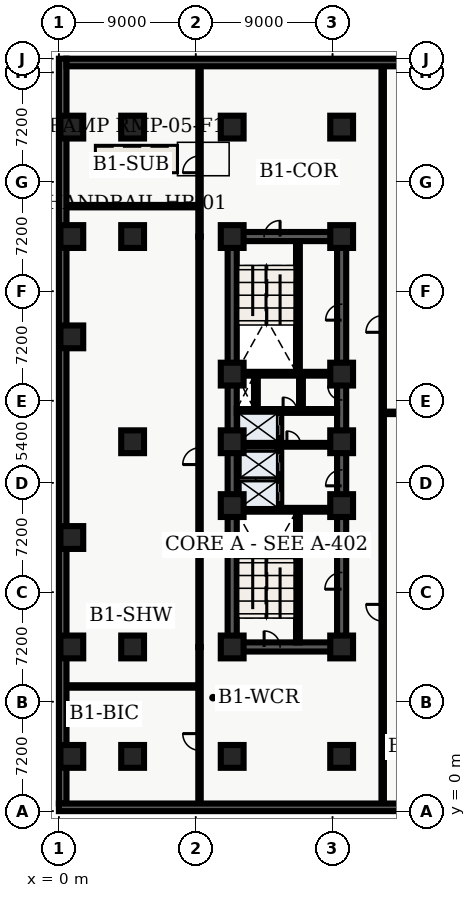
"""IFC4 building model, lengths in metres.
Left out: names, types, materials, properties, quantities, classifications, styles, units other than length and angle.
Written with IfcOpenShell. Run it as: python <this file> out.ifc"""

import sys

from ifc_helpers import new_model, entity, si_unit, converted_unit, direction, frame, origin_with_axes, origin_2d_with_axis, place, context, subcontext, project, spatial, polyline, rectangle, outline, extrude, element, fill, save


model = new_model("IFC4")
c1 = context("Model", 3, precision=1e-05, world=origin_with_axes(), true_north=direction((0.0, 1.0)))
c2 = subcontext(c1, "Body", "Model", "MODEL_VIEW")
j1 = project(units=[si_unit("LENGTHUNIT", "METRE"), converted_unit("PLANEANGLEUNIT", "DEGREE", entity("IfcPlaneAngleMeasure", 0.017), si_unit("PLANEANGLEUNIT", "RADIAN"), dimensions=[0, 0, 0, 0, 0, 0, 0])], contexts=[c1])
p1 = place(None, origin_with_axes())
s1 = spatial("IfcSite", under=j1, at=p1, CompositionType="ELEMENT")
p2 = place(p1, origin_with_axes())
s2 = spatial("IfcBuilding", under=s1, at=p2, CompositionType="ELEMENT")
p3 = place(p2, frame((0.0, 0.0, -4.8), z_axis=(0.0, 0.0, 1.0), x_axis=(1.0, 0.0, 0.0)))
s3 = spatial("IfcBuildingStorey", under=s2, at=p3, CompositionType="ELEMENT", Elevation=-4.8)
p4 = place(p3, frame((11.4, 10.8, 0.0), z_axis=(0.0, 0.0, 1.0), x_axis=(0.0, 1.0, 0.0)))
e1 = element("IfcWall", 1, at=p4, inside=s3, PredefinedType="SHEAR", context=c2, shape_type="SweptSolid", body=[
    extrude(outline(polyline([(0.0, -0.3), (27.0, -0.3), (27.0, 0.3), (0.0, 0.3), (0.0, -0.3)])), origin_with_axes(), (0.0, 0.0, 1.0), 4.48),
])
p5 = place(p3, frame((11.4, 10.8, 0.0), z_axis=(0.0, 0.0, 1.0), x_axis=(1.0, 0.0, 0.0)))
e2 = element("IfcWall", 2, at=p5, inside=s3, PredefinedType="SHEAR", context=c2, shape_type="SweptSolid", body=[
    extrude(outline(polyline([(0.0, -0.3), (7.2, -0.3), (7.2, 0.3), (0.0, 0.3), (0.0, -0.3)])), origin_with_axes(), (0.0, 0.0, 1.0), 4.48),
])
p6 = place(p5, frame((2.625, 0.0, 0.0), z_axis=(0.0, 0.0, 1.0), x_axis=(1.0, 0.0, 0.0)))
e3 = element("IfcOpeningElement", 3, at=p6, cuts=e2, PredefinedType="OPENING", context=c2, shape_type="SweptSolid", body=[
    extrude(rectangle(XDim=1.05, YDim=0.62, at=origin_2d_with_axis()), origin_with_axes(), (0.0, 0.0, 1.0), 2.15),
])
p7 = place(p3, frame((11.4, 37.8, 0.0), z_axis=(0.0, 0.0, 1.0), x_axis=(1.0, 0.0, 0.0)))
e4 = element("IfcWall", 4, at=p7, inside=s3, PredefinedType="SHEAR", context=c2, shape_type="SweptSolid", body=[
    extrude(outline(polyline([(0.0, -0.3), (7.2, -0.3), (7.2, 0.3), (0.0, 0.3), (0.0, -0.3)])), origin_with_axes(), (0.0, 0.0, 1.0), 4.48),
])
p8 = place(p7, frame((2.625, 0.0, 0.0), z_axis=(0.0, 0.0, 1.0), x_axis=(1.0, 0.0, 0.0)))
e5 = element("IfcOpeningElement", 5, at=p8, cuts=e4, PredefinedType="OPENING", context=c2, shape_type="SweptSolid", body=[
    extrude(rectangle(XDim=1.05, YDim=0.62, at=origin_2d_with_axis()), origin_with_axes(), (0.0, 0.0, 1.0), 2.15),
])
p9 = place(p3, frame((18.6, 10.8, 0.0), z_axis=(0.0, 0.0, 1.0), x_axis=(0.0, 1.0, 0.0)))
e6 = element("IfcWall", 6, at=p9, inside=s3, PredefinedType="SHEAR", context=c2, shape_type="SweptSolid", body=[
    extrude(outline(polyline([(0.0, -0.3), (13.5, -0.3), (13.5, 0.3), (0.0, 0.3), (0.0, -0.3)])), origin_with_axes(), (0.0, 0.0, 1.0), 4.48),
])
p10 = place(p9, frame((11.125, 0.0, 0.0), z_axis=(0.0, 0.0, 1.0), x_axis=(1.0, 0.0, 0.0)))
e7 = element("IfcOpeningElement", 7, at=p10, cuts=e6, PredefinedType="OPENING", context=c2, shape_type="SweptSolid", body=[
    extrude(rectangle(XDim=1.05, YDim=0.62, at=origin_2d_with_axis()), origin_with_axes(), (0.0, 0.0, 1.0), 2.15),
])
p11 = place(p9, frame((4.35, 0.0, 0.0), z_axis=(0.0, 0.0, 1.0), x_axis=(1.0, 0.0, 0.0)))
e8 = element("IfcOpeningElement", 8, at=p11, cuts=e6, PredefinedType="OPENING", context=c2, shape_type="SweptSolid", body=[
    extrude(rectangle(XDim=1.1, YDim=0.62, at=origin_2d_with_axis()), origin_with_axes(), (0.0, 0.0, 1.0), 2.15),
])
p12 = place(p3, frame((18.6, 24.3, 0.0), z_axis=(0.0, 0.0, 1.0), x_axis=(0.0, 1.0, 0.0)))
e9 = element("IfcWall", 9, at=p12, inside=s3, PredefinedType="SHEAR", context=c2, shape_type="SweptSolid", body=[
    extrude(outline(polyline([(0.0, -0.3), (13.5, -0.3), (13.5, 0.3), (0.0, 0.3), (0.0, -0.3)])), origin_with_axes(), (0.0, 0.0, 1.0), 4.48),
])
p13 = place(p12, frame((3.2, 0.0, 0.0), z_axis=(0.0, 0.0, 1.0), x_axis=(1.0, 0.0, 0.0)))
e10 = element("IfcOpeningElement", 10, at=p13, cuts=e9, PredefinedType="OPENING", context=c2, shape_type="SweptSolid", body=[
    extrude(rectangle(XDim=0.9, YDim=0.62, at=origin_2d_with_axis()), origin_with_axes(), (0.0, 0.0, 1.0), 2.15),
])
p14 = place(p12, frame((8.525, 0.0, 0.0), z_axis=(0.0, 0.0, 1.0), x_axis=(1.0, 0.0, 0.0)))
e11 = element("IfcOpeningElement", 11, at=p14, cuts=e9, PredefinedType="OPENING", context=c2, shape_type="SweptSolid", body=[
    extrude(rectangle(XDim=1.05, YDim=0.62, at=origin_2d_with_axis()), origin_with_axes(), (0.0, 0.0, 1.0), 2.15),
])
p15 = place(p3, frame((15.725, 11.1, 0.0), z_axis=(0.0, 0.0, 1.0), x_axis=(0.0, 1.0, 0.0)))
e12 = element("IfcWall", 12, at=p15, inside=s3, PredefinedType="SHEAR", context=c2, shape_type="SweptSolid", body=[
    extrude(outline(polyline([(0.0, -0.125), (8.6, -0.125), (8.6, 0.125), (0.0, 0.125), (0.0, -0.125)])), origin_with_axes(), (0.0, 0.0, 1.0), 4.48),
])
p16 = place(p3, frame((11.7, 19.825, 0.0), z_axis=(0.0, 0.0, 1.0), x_axis=(1.0, 0.0, 0.0)))
e13 = element("IfcWall", 13, at=p16, inside=s3, PredefinedType="SHEAR", context=c2, shape_type="SweptSolid", body=[
    extrude(outline(polyline([(0.0, -0.125), (6.6, -0.125), (6.6, 0.125), (0.0, 0.125), (0.0, -0.125)])), origin_with_axes(), (0.0, 0.0, 1.0), 4.48),
])
p17 = place(p3, frame((15.725, 28.9, 0.0), z_axis=(0.0, 0.0, 1.0), x_axis=(0.0, 1.0, 0.0)))
e14 = element("IfcWall", 14, at=p17, inside=s3, PredefinedType="SHEAR", context=c2, shape_type="SweptSolid", body=[
    extrude(outline(polyline([(0.0, -0.125), (8.6, -0.125), (8.6, 0.125), (0.0, 0.125), (0.0, -0.125)])), origin_with_axes(), (0.0, 0.0, 1.0), 4.48),
])
p18 = place(p3, frame((11.7, 28.775, 0.0), z_axis=(0.0, 0.0, 1.0), x_axis=(1.0, 0.0, 0.0)))
e15 = element("IfcWall", 15, at=p18, inside=s3, PredefinedType="SHEAR", context=c2, shape_type="SweptSolid", body=[
    extrude(outline(polyline([(0.0, -0.125), (6.6, -0.125), (6.6, 0.125), (0.0, 0.125), (0.0, -0.125)])), origin_with_axes(), (0.0, 0.0, 1.0), 4.48),
])
p19 = place(p3, frame((14.5, 19.95, 0.0), z_axis=(0.0, 0.0, 1.0), x_axis=(0.0, 1.0, 0.0)))
e16 = element("IfcWall", 16, at=p19, inside=s3, PredefinedType="SOLIDWALL", context=c2, shape_type="SweptSolid", body=[
    extrude(outline(polyline([(0.0, -0.125), (6.25, -0.125), (6.25, 0.125), (0.0, 0.125), (0.0, -0.125)])), origin_with_axes(), (0.0, 0.0, 1.0), 3.52),
])
p20 = place(p19, frame((1.025, 0.0, 0.0), z_axis=(0.0, 0.0, 1.0), x_axis=(1.0, 0.0, 0.0)))
e17 = element("IfcOpeningElement", 17, at=p20, cuts=e16, PredefinedType="OPENING", context=c2, shape_type="SweptSolid", body=[
    extrude(rectangle(XDim=1.1, YDim=0.27, at=origin_2d_with_axis()), origin_with_axes(), (0.0, 0.0, 1.0), 2.15),
])
p21 = place(p19, frame((2.975, 0.0, 0.0), z_axis=(0.0, 0.0, 1.0), x_axis=(1.0, 0.0, 0.0)))
e18 = element("IfcOpeningElement", 18, at=p21, cuts=e16, PredefinedType="OPENING", context=c2, shape_type="SweptSolid", body=[
    extrude(rectangle(XDim=1.1, YDim=0.27, at=origin_2d_with_axis()), origin_with_axes(), (0.0, 0.0, 1.0), 2.15),
])
p22 = place(p19, frame((5.425, 0.0, 0.0), z_axis=(0.0, 0.0, 1.0), x_axis=(1.0, 0.0, 0.0)))
e19 = element("IfcOpeningElement", 19, at=p22, cuts=e16, PredefinedType="OPENING", context=c2, shape_type="SweptSolid", body=[
    extrude(rectangle(XDim=1.2, YDim=0.27, at=origin_2d_with_axis()), origin_with_axes(), (0.0, 0.0, 1.0), 2.15),
])
p23 = place(p3, frame((11.7, 24.1, 0.0), z_axis=(0.0, 0.0, 1.0), x_axis=(1.0, 0.0, 0.0)))
e20 = element("IfcWall", 20, at=p23, inside=s3, PredefinedType="SOLIDWALL", context=c2, shape_type="SweptSolid", body=[
    extrude(outline(polyline([(0.0, -0.125), (6.6, -0.125), (6.6, 0.125), (0.0, 0.125), (0.0, -0.125)])), origin_with_axes(), (0.0, 0.0, 1.0), 3.52),
])
p24 = place(p23, frame((3.75, 0.0, 0.0), z_axis=(0.0, 0.0, 1.0), x_axis=(1.0, 0.0, 0.0)))
e21 = element("IfcOpeningElement", 21, at=p24, cuts=e20, PredefinedType="OPENING", context=c2, shape_type="SweptSolid", body=[
    extrude(rectangle(XDim=0.9, YDim=0.27, at=origin_2d_with_axis()), origin_with_axes(), (0.0, 0.0, 1.0), 2.15),
])
p25 = place(p3, frame((11.7, 26.325, 0.0), z_axis=(0.0, 0.0, 1.0), x_axis=(1.0, 0.0, 0.0)))
e22 = element("IfcWall", 22, at=p25, inside=s3, PredefinedType="SOLIDWALL", context=c2, shape_type="SweptSolid", body=[
    extrude(outline(polyline([(0.0, -0.125), (6.6, -0.125), (6.6, 0.125), (0.0, 0.125), (0.0, -0.125)])), origin_with_axes(), (0.0, 0.0, 1.0), 3.52),
])
p26 = place(p25, frame((3.5, 0.0, 0.0), z_axis=(0.0, 0.0, 1.0), x_axis=(1.0, 0.0, 0.0)))
e23 = element("IfcOpeningElement", 23, at=p26, cuts=e22, PredefinedType="OPENING", context=c2, shape_type="SweptSolid", body=[
    extrude(rectangle(XDim=0.9, YDim=0.27, at=origin_2d_with_axis()), origin_with_axes(), (0.0, 0.0, 1.0), 2.15),
])
for number, where, z_axis, x_axis in (
    (24, (12.96, 26.45, 0.0), (0.0, 0.0, 1.0), (0.0, 1.0, 0.0)),
    (25, (15.925, 26.45, 0.0), (0.0, 0.0, 1.0), (0.0, 1.0, 0.0)),
):
    element("IfcWall", number, at=place(p3, frame(where, z_axis=z_axis, x_axis=x_axis)), inside=s3, PredefinedType="SOLIDWALL", context=c2, shape_type="SweptSolid", body=[
        extrude(outline(polyline([(0.0, -0.125), (2.2, -0.125), (2.2, 0.125), (0.0, 0.125), (0.0, -0.125)])), origin_with_axes(), (0.0, 0.0, 1.0), 3.52),
    ])
for number, where, z_axis, x_axis in (
    (26, (11.4, 3.6, 0.0), (0.0, 0.0, 1.0), (1.0, 0.0, 0.0)),
    (27, (11.4, 10.8, 0.0), (0.0, 0.0, 1.0), (1.0, 0.0, 0.0)),
    (28, (11.4, 20.1, 0.0), (0.0, 0.0, 1.0), (1.0, 0.0, 0.0)),
    (29, (11.4, 24.3, 0.0), (0.0, 0.0, 1.0), (1.0, 0.0, 0.0)),
    (30, (11.4, 28.75, 0.0), (0.0, 0.0, 1.0), (1.0, 0.0, 0.0)),
    (31, (11.4, 37.8, 0.0), (0.0, 0.0, 1.0), (1.0, 0.0, 0.0)),
    (32, (11.4, 45.0, 0.0), (0.0, 0.0, 1.0), (1.0, 0.0, 0.0)),
    (33, (18.6, 3.6, 0.0), (0.0, 0.0, 1.0), (1.0, 0.0, 0.0)),
    (34, (18.6, 10.8, 0.0), (0.0, 0.0, 1.0), (1.0, 0.0, 0.0)),
    (35, (18.6, 20.1, 0.0), (0.0, 0.0, 1.0), (1.0, 0.0, 0.0)),
    (36, (18.6, 24.3, 0.0), (0.0, 0.0, 1.0), (1.0, 0.0, 0.0)),
    (37, (18.6, 28.75, 0.0), (0.0, 0.0, 1.0), (1.0, 0.0, 0.0)),
    (38, (18.6, 37.8, 0.0), (0.0, 0.0, 1.0), (1.0, 0.0, 0.0)),
    (39, (18.6, 45.0, 0.0), (0.0, 0.0, 1.0), (1.0, 0.0, 0.0)),
    (40, (4.85, 3.6, 0.0), (0.0, 0.0, 1.0), (1.0, 0.0, 0.0)),
    (41, (4.85, 10.8, 0.0), (0.0, 0.0, 1.0), (1.0, 0.0, 0.0)),
    (42, (4.85, 24.3, 0.0), (0.0, 0.0, 1.0), (1.0, 0.0, 0.0)),
    (43, (4.85, 37.8, 0.0), (0.0, 0.0, 1.0), (1.0, 0.0, 0.0)),
    (44, (4.85, 45.0, 0.0), (0.0, 0.0, 1.0), (1.0, 0.0, 0.0)),
    (45, (0.85, 3.6, 0.0), (0.0, 0.0, 1.0), (1.0, 0.0, 0.0)),
    (46, (0.85, 10.8, 0.0), (0.0, 0.0, 1.0), (1.0, 0.0, 0.0)),
    (47, (0.85, 18.0, 0.0), (0.0, 0.0, 1.0), (1.0, 0.0, 0.0)),
    (48, (0.85, 31.2, 0.0), (0.0, 0.0, 1.0), (1.0, 0.0, 0.0)),
    (49, (0.85, 37.8, 0.0), (0.0, 0.0, 1.0), (1.0, 0.0, 0.0)),
    (50, (0.85, 45.0, 0.0), (0.0, 0.0, 1.0), (1.0, 0.0, 0.0)),
):
    element("IfcColumn", number, at=place(p3, frame(where, z_axis=z_axis, x_axis=x_axis)), inside=s3, PredefinedType="COLUMN", context=c2, shape_type="SweptSolid", body=[
        extrude(rectangle(XDim=1.5, YDim=1.5, at=origin_2d_with_axis()), origin_with_axes(), (0.0, 0.0, 1.0), 4.8),
    ])
p27 = place(p3, frame((9.25, 0.5, 0.0), z_axis=(0.0, 0.0, 1.0), x_axis=(0.0, 1.0, 0.0)))
e51 = element("IfcWall", 51, at=p27, inside=s3, PredefinedType="PARTITIONING", context=c2, shape_type="SweptSolid", body=[
    extrude(outline(polyline([(0.0, -0.08), (10.3, -0.08), (10.3, 0.08), (0.0, 0.08), (0.0, -0.08)])), origin_with_axes(), (0.0, 0.0, 1.0), 3.2),
])
p28 = place(p27, frame((4.05, 0.0, 0.0), z_axis=(0.0, 0.0, 1.0), x_axis=(1.0, 0.0, 0.0)))
e52 = element("IfcOpeningElement", 52, at=p28, cuts=e51, PredefinedType="OPENING", context=c2, shape_type="SweptSolid", body=[
    extrude(rectangle(XDim=1.1, YDim=0.18, at=origin_2d_with_axis()), origin_with_axes(), (0.0, 0.0, 1.0), 2.15),
])
p29 = place(p3, frame((9.25, 37.8, 0.0), z_axis=(0.0, 0.0, 1.0), x_axis=(0.0, 1.0, 0.0)))
e53 = element("IfcWall", 53, at=p29, inside=s3, PredefinedType="PARTITIONING", context=c2, shape_type="SweptSolid", body=[
    extrude(outline(polyline([(0.0, -0.08), (11.2, -0.08), (11.2, 0.08), (0.0, 0.08), (0.0, -0.08)])), origin_with_axes(), (0.0, 0.0, 1.0), 3.2),
])
p30 = place(p29, frame((4.75, 0.0, 0.0), z_axis=(0.0, 0.0, 1.0), x_axis=(1.0, 0.0, 0.0)))
e54 = element("IfcOpeningElement", 54, at=p30, cuts=e53, PredefinedType="OPENING", context=c2, shape_type="SweptSolid", body=[
    extrude(rectangle(XDim=1.1, YDim=0.18, at=origin_2d_with_axis()), origin_with_axes(), (0.0, 0.0, 1.0), 2.15),
])
p31 = place(p3, frame((9.25, 10.8, 0.0), z_axis=(0.0, 0.0, 1.0), x_axis=(0.0, 1.0, 0.0)))
e55 = element("IfcWall", 55, at=p31, inside=s3, PredefinedType="PARTITIONING", context=c2, shape_type="SweptSolid", body=[
    extrude(outline(polyline([(0.0, -0.08), (27.0, -0.08), (27.0, 0.08), (0.0, 0.08), (0.0, -0.08)])), origin_with_axes(), (0.0, 0.0, 1.0), 3.2),
])
p32 = place(p31, frame((12.55, 0.0, 0.0), z_axis=(0.0, 0.0, 1.0), x_axis=(1.0, 0.0, 0.0)))
e56 = element("IfcOpeningElement", 56, at=p32, cuts=e55, PredefinedType="OPENING", context=c2, shape_type="SweptSolid", body=[
    extrude(rectangle(XDim=1.1, YDim=0.18, at=origin_2d_with_axis()), origin_with_axes(), (0.0, 0.0, 1.0), 2.15),
])
p33 = place(p3, frame((21.3, 0.5, 0.0), z_axis=(0.0, 0.0, 1.0), x_axis=(0.0, 1.0, 0.0)))
e57 = element("IfcWall", 57, at=p33, inside=s3, PredefinedType="PARTITIONING", context=c2, shape_type="SweptSolid", body=[
    extrude(outline(polyline([(0.0, -0.08), (48.5, -0.08), (48.5, 0.08), (0.0, 0.08), (0.0, -0.08)])), origin_with_axes(), (0.0, 0.0, 1.0), 3.2),
])
p34 = place(p33, frame((31.55, 0.0, 0.0), z_axis=(0.0, 0.0, 1.0), x_axis=(1.0, 0.0, 0.0)))
e58 = element("IfcOpeningElement", 58, at=p34, cuts=e57, PredefinedType="OPENING", context=c2, shape_type="SweptSolid", body=[
    extrude(rectangle(XDim=1.1, YDim=0.18, at=origin_2d_with_axis()), origin_with_axes(), (0.0, 0.0, 1.0), 2.15),
])
p35 = place(p33, frame((12.55, 0.0, 0.0), z_axis=(0.0, 0.0, 1.0), x_axis=(1.0, 0.0, 0.0)))
e59 = element("IfcOpeningElement", 59, at=p35, cuts=e57, PredefinedType="OPENING", context=c2, shape_type="SweptSolid", body=[
    extrude(rectangle(XDim=1.1, YDim=0.18, at=origin_2d_with_axis()), origin_with_axes(), (0.0, 0.0, 1.0), 2.15),
])
p36 = place(p3, frame((21.3, 26.2, 0.0), z_axis=(0.0, 0.0, 1.0), x_axis=(1.0, 0.0, 0.0)))
e60 = element("IfcWall", 60, at=p36, inside=s3, PredefinedType="PARTITIONING", context=c2, shape_type="SweptSolid", body=[
    extrude(outline(polyline([(0.0, -0.08), (61.6, -0.08), (61.6, 0.08), (0.0, 0.08), (0.0, -0.08)])), origin_with_axes(), (0.0, 0.0, 1.0), 3.2),
])
p37 = place(p36, frame((34.55, 0.0, 0.0), z_axis=(0.0, 0.0, 1.0), x_axis=(1.0, 0.0, 0.0)))
e61 = element("IfcOpeningElement", 61, at=p37, cuts=e60, PredefinedType="OPENING", context=c2, shape_type="SweptSolid", body=[
    extrude(rectangle(XDim=1.1, YDim=0.18, at=origin_2d_with_axis()), origin_with_axes(), (0.0, 0.0, 1.0), 2.15),
])
for number, where, z_axis, x_axis in (
    (62, (0.5, 8.2, 0.0), (0.0, 0.0, 1.0), (1.0, 0.0, 0.0)),
    (63, (0.5, 39.8, 0.0), (0.0, 0.0, 1.0), (1.0, 0.0, 0.0)),
):
    element("IfcWall", number, at=place(p3, frame(where, z_axis=z_axis, x_axis=x_axis)), inside=s3, PredefinedType="PARTITIONING", context=c2, shape_type="SweptSolid", body=[
        extrude(outline(polyline([(0.0, -0.08), (8.75, -0.08), (8.75, 0.08), (0.0, 0.08), (0.0, -0.08)])), origin_with_axes(), (0.0, 0.0, 1.0), 3.2),
    ])
p38 = place(p3, frame((0.25, 0.5, 0.0), z_axis=(0.0, 0.0, 1.0), x_axis=(0.0, 1.0, 0.0)))
e64 = element("IfcWall", 64, at=p38, inside=s3, PredefinedType="USERDEFINED", context=c2, shape_type="SweptSolid", body=[
    extrude(outline(polyline([(0.0, -0.25), (49.0, -0.25), (49.0, 0.25), (0.0, 0.25), (0.0, -0.25)])), origin_with_axes(), (0.0, 0.0, 1.0), 4.48),
])
for number, where, z_axis, x_axis in (
    (65, (0.5, 49.25, 0.0), (0.0, 0.0, 1.0), (1.0, 0.0, 0.0)),
    (66, (82.9, 0.25, 0.0), (0.0, 0.0, 1.0), (-1.0, 0.0, 0.0)),
):
    element("IfcWall", number, at=place(p3, frame(where, z_axis=z_axis, x_axis=x_axis)), inside=s3, PredefinedType="USERDEFINED", context=c2, shape_type="SweptSolid", body=[
        extrude(outline(polyline([(0.0, -0.25), (82.9, -0.25), (82.9, 0.25), (0.0, 0.25), (0.0, -0.25)])), origin_with_axes(), (0.0, 0.0, 1.0), 4.48),
    ])
p39 = place(p19, frame((1.025, 0.0, 0.0), z_axis=(0.0, 0.0, 1.0), x_axis=(1.0, 0.0, 0.0)))
e67 = element("IfcDoor", 67, at=p39, inside=s3, OperationType="SLIDING_TO_LEFT", PredefinedType="DOOR", context=c2, shape_type="SweptSolid", body=[
    extrude(rectangle(XDim=1.1, YDim=0.09, at=origin_2d_with_axis()), origin_with_axes(), (0.0, 0.0, 1.0), 2.15),
])
fill(e17, e67)
p40 = place(p19, frame((2.975, 0.0, 0.0), z_axis=(0.0, 0.0, 1.0), x_axis=(1.0, 0.0, 0.0)))
e68 = element("IfcDoor", 68, at=p40, inside=s3, OperationType="SLIDING_TO_RIGHT", PredefinedType="DOOR", context=c2, shape_type="SweptSolid", body=[
    extrude(rectangle(XDim=1.1, YDim=0.09, at=origin_2d_with_axis()), origin_with_axes(), (0.0, 0.0, 1.0), 2.15),
])
fill(e18, e68)
p41 = place(p19, frame((5.425, 0.0, 0.0), z_axis=(0.0, 0.0, 1.0), x_axis=(1.0, 0.0, 0.0)))
e69 = element("IfcDoor", 69, at=p41, inside=s3, OperationType="DOUBLE_DOOR_SLIDING", PredefinedType="DOOR", context=c2, shape_type="SweptSolid", body=[
    extrude(rectangle(XDim=1.2, YDim=0.09, at=origin_2d_with_axis()), origin_with_axes(), (0.0, 0.0, 1.0), 2.15),
])
fill(e19, e69)
p42 = place(p12, frame((3.2, 0.0, 0.0), z_axis=(0.0, 0.0, 1.0), x_axis=(1.0, 0.0, 0.0)))
e70 = element("IfcDoor", 70, at=p42, inside=s3, OperationType="SINGLE_SWING_RIGHT", PredefinedType="DOOR", context=c2, shape_type="SweptSolid", body=[
    extrude(rectangle(XDim=0.9, YDim=0.09, at=origin_2d_with_axis()), origin_with_axes(), (0.0, 0.0, 1.0), 2.15),
])
fill(e10, e70)
p43 = place(p5, frame((2.625, 0.0, 0.0), z_axis=(0.0, 0.0, 1.0), x_axis=(1.0, 0.0, 0.0)))
e71 = element("IfcDoor", 71, at=p43, inside=s3, OperationType="SINGLE_SWING_LEFT", PredefinedType="DOOR", context=c2, shape_type="SweptSolid", body=[
    extrude(rectangle(XDim=1.05, YDim=0.09, at=origin_2d_with_axis()), origin_with_axes(), (0.0, 0.0, 1.0), 2.15),
])
fill(e3, e71)
p44 = place(p7, frame((2.625, 0.0, 0.0), z_axis=(0.0, 0.0, 1.0), x_axis=(1.0, 0.0, 0.0)))
e72 = element("IfcDoor", 72, at=p44, inside=s3, OperationType="SINGLE_SWING_RIGHT", PredefinedType="DOOR", context=c2, shape_type="SweptSolid", body=[
    extrude(rectangle(XDim=1.05, YDim=0.09, at=origin_2d_with_axis()), origin_with_axes(), (0.0, 0.0, 1.0), 2.15),
])
fill(e5, e72)
p45 = place(p9, frame((11.125, 0.0, 0.0), z_axis=(0.0, 0.0, 1.0), x_axis=(1.0, 0.0, 0.0)))
e73 = element("IfcDoor", 73, at=p45, inside=s3, OperationType="SINGLE_SWING_LEFT", PredefinedType="DOOR", context=c2, shape_type="SweptSolid", body=[
    extrude(rectangle(XDim=1.05, YDim=0.09, at=origin_2d_with_axis()), origin_with_axes(), (0.0, 0.0, 1.0), 2.15),
])
fill(e7, e73)
p46 = place(p23, frame((3.75, 0.0, 0.0), z_axis=(0.0, 0.0, 1.0), x_axis=(1.0, 0.0, 0.0)))
e74 = element("IfcDoor", 74, at=p46, inside=s3, OperationType="SINGLE_SWING_LEFT", PredefinedType="DOOR", context=c2, shape_type="SweptSolid", body=[
    extrude(rectangle(XDim=0.9, YDim=0.09, at=origin_2d_with_axis()), origin_with_axes(), (0.0, 0.0, 1.0), 2.15),
])
fill(e21, e74)
p47 = place(p25, frame((3.5, 0.0, 0.0), z_axis=(0.0, 0.0, 1.0), x_axis=(1.0, 0.0, 0.0)))
e75 = element("IfcDoor", 75, at=p47, inside=s3, OperationType="SINGLE_SWING_LEFT", PredefinedType="DOOR", context=c2, shape_type="SweptSolid", body=[
    extrude(rectangle(XDim=0.9, YDim=0.09, at=origin_2d_with_axis()), origin_with_axes(), (0.0, 0.0, 1.0), 2.15),
])
fill(e23, e75)
p48 = place(p9, frame((4.35, 0.0, 0.0), z_axis=(0.0, 0.0, 1.0), x_axis=(1.0, 0.0, 0.0)))
e76 = element("IfcDoor", 76, at=p48, inside=s3, OperationType="SINGLE_SWING_LEFT", PredefinedType="DOOR", context=c2, shape_type="SweptSolid", body=[
    extrude(rectangle(XDim=1.1, YDim=0.09, at=origin_2d_with_axis()), origin_with_axes(), (0.0, 0.0, 1.0), 2.15),
])
fill(e8, e76)
p49 = place(p12, frame((8.525, 0.0, 0.0), z_axis=(0.0, 0.0, 1.0), x_axis=(1.0, 0.0, 0.0)))
e77 = element("IfcDoor", 77, at=p49, inside=s3, OperationType="SINGLE_SWING_LEFT", PredefinedType="DOOR", context=c2, shape_type="SweptSolid", body=[
    extrude(rectangle(XDim=1.05, YDim=0.09, at=origin_2d_with_axis()), origin_with_axes(), (0.0, 0.0, 1.0), 2.15),
])
fill(e11, e77)
p50 = place(p33, frame((31.55, 0.0, 0.0), z_axis=(0.0, 0.0, 1.0), x_axis=(1.0, 0.0, 0.0)))
e78 = element("IfcDoor", 78, at=p50, inside=s3, OperationType="SINGLE_SWING_LEFT", PredefinedType="DOOR", context=c2, shape_type="SweptSolid", body=[
    extrude(rectangle(XDim=1.1, YDim=0.09, at=origin_2d_with_axis()), origin_with_axes(), (0.0, 0.0, 1.0), 2.15),
])
fill(e58, e78)
p51 = place(p27, frame((4.05, 0.0, 0.0), z_axis=(0.0, 0.0, 1.0), x_axis=(1.0, 0.0, 0.0)))
e79 = element("IfcDoor", 79, at=p51, inside=s3, OperationType="SINGLE_SWING_RIGHT", PredefinedType="DOOR", context=c2, shape_type="SweptSolid", body=[
    extrude(rectangle(XDim=1.1, YDim=0.09, at=origin_2d_with_axis()), origin_with_axes(), (0.0, 0.0, 1.0), 2.15),
])
fill(e52, e79)
p52 = place(p31, frame((12.55, 0.0, 0.0), z_axis=(0.0, 0.0, 1.0), x_axis=(1.0, 0.0, 0.0)))
e80 = element("IfcDoor", 80, at=p52, inside=s3, OperationType="SINGLE_SWING_LEFT", PredefinedType="DOOR", context=c2, shape_type="SweptSolid", body=[
    extrude(rectangle(XDim=1.1, YDim=0.09, at=origin_2d_with_axis()), origin_with_axes(), (0.0, 0.0, 1.0), 2.15),
])
fill(e56, e80)
p53 = place(p29, frame((4.75, 0.0, 0.0), z_axis=(0.0, 0.0, 1.0), x_axis=(1.0, 0.0, 0.0)))
e81 = element("IfcDoor", 81, at=p53, inside=s3, OperationType="SINGLE_SWING_LEFT", PredefinedType="DOOR", context=c2, shape_type="SweptSolid", body=[
    extrude(rectangle(XDim=1.1, YDim=0.09, at=origin_2d_with_axis()), origin_with_axes(), (0.0, 0.0, 1.0), 2.15),
])
fill(e54, e81)
p54 = place(p33, frame((12.55, 0.0, 0.0), z_axis=(0.0, 0.0, 1.0), x_axis=(1.0, 0.0, 0.0)))
e82 = element("IfcDoor", 82, at=p54, inside=s3, OperationType="SINGLE_SWING_RIGHT", PredefinedType="DOOR", context=c2, shape_type="SweptSolid", body=[
    extrude(rectangle(XDim=1.1, YDim=0.09, at=origin_2d_with_axis()), origin_with_axes(), (0.0, 0.0, 1.0), 2.15),
])
fill(e59, e82)
save(model, sys.argv[1])
